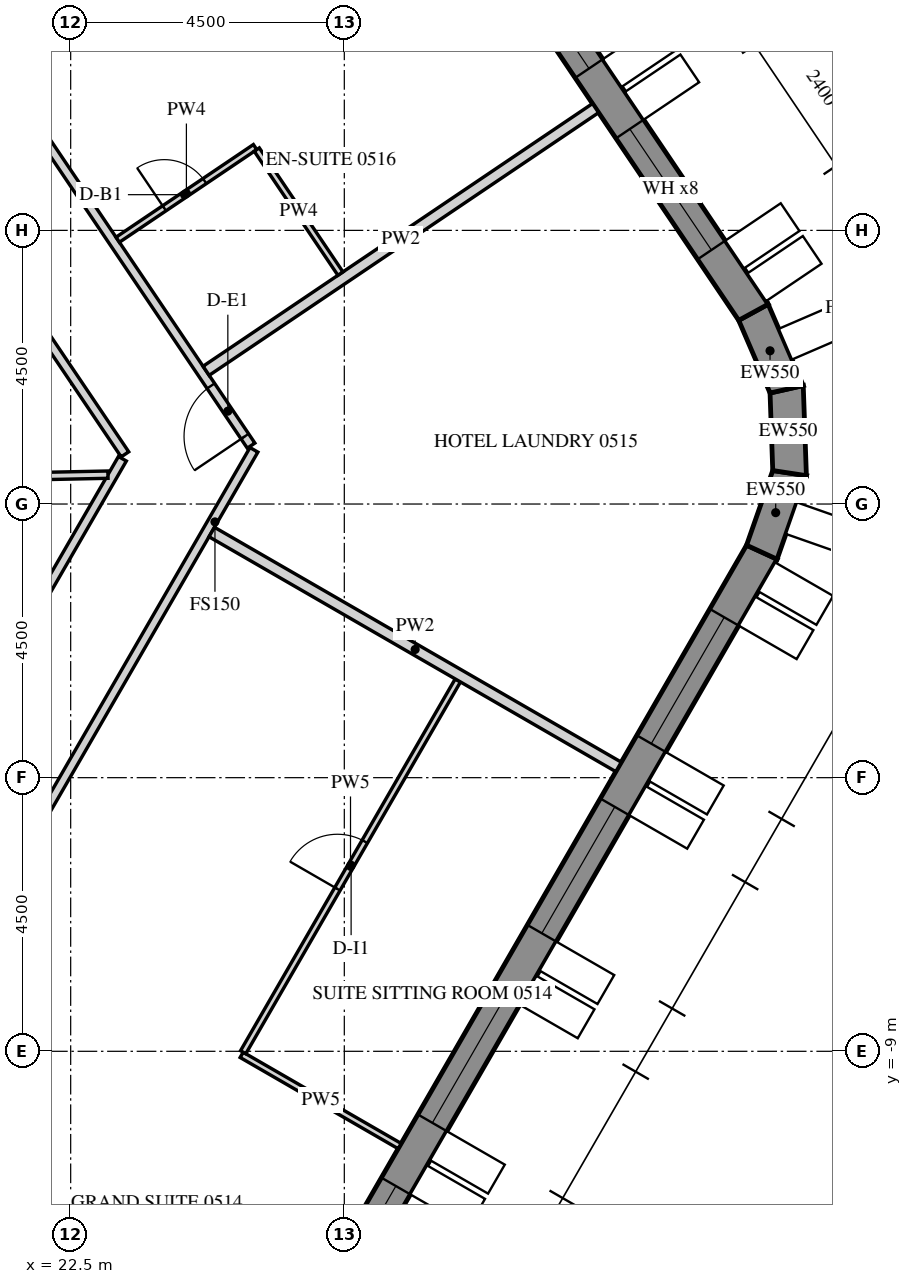
"""IFC4 building model, lengths in metres.
Left out: names, types, materials, properties, quantities, classifications, styles, units other than length and angle.
Written with IfcOpenShell. Run it as: python <this file> out.ifc"""

import sys

from ifc_helpers import new_model, si_unit, direction, frame, frame_2d, origin, place, context, subcontext, project, spatial, polyline, rectangle, outline, extrude, element, fill, save


model = new_model("IFC4")
c1 = context("Model", 3, precision=1e-05, world=origin(), true_north=direction((0.0, 1.0)))
c2 = subcontext(c1, "Body", "Model", "MODEL_VIEW")
j1 = project(units=[si_unit("LENGTHUNIT", "METRE"), si_unit("PLANEANGLEUNIT", "RADIAN")], contexts=[c1])
p1 = place(None, origin())
s1 = spatial("IfcSite", under=j1, at=p1, CompositionType="ELEMENT")
p2 = place(p1, origin())
s2 = spatial("IfcBuilding", under=s1, at=p2, CompositionType="ELEMENT")
p3 = place(p2, frame((0.0, 0.0, 80.4)))
s3 = spatial("IfcBuildingStorey", under=s2, at=p3, CompositionType="ELEMENT", Elevation=80.4)
p4 = place(p3, frame((18.83, -26.835, -0.15), z_axis=(0.0, 0.0, 1.0), x_axis=(0.500003800416, 0.866023209602, 0.0)))
e1 = element("IfcWall", 1, at=p4, inside=s3, PredefinedType="SOLIDWALL", context=c2, shape_type="SweptSolid", body=[
    extrude(outline(polyline([(-0.022, -0.275), (30.097, -0.275), (30.045, 0.275), (0.022, 0.275), (-0.022, -0.275)])), origin(), (0.0, 0.0, 1.0), 3.9),
])
p5 = place(p4, frame((1.236, 0.0, 1.05)))
e2 = element("IfcOpeningElement", 2, at=p5, cuts=e1, PredefinedType="OPENING", context=c2, shape_type="SweptSolid", body=[
    extrude(rectangle(XDim=2.4, YDim=2.4, at=frame_2d((1.2, 1.2))), frame((0.0, 0.285, 0.0), z_axis=(0.0, -1.0, 0.0), x_axis=(1.0, 0.0, 0.0)), (0.0, 0.0, 1.0), 0.57),
])
p6 = place(p4, frame((4.835, 0.0, 1.05)))
e3 = element("IfcOpeningElement", 3, at=p6, cuts=e1, PredefinedType="OPENING", context=c2, shape_type="SweptSolid", body=[
    extrude(rectangle(XDim=2.4, YDim=2.4, at=frame_2d((1.2, 1.2))), frame((0.0, 0.285, 0.0), z_axis=(0.0, -1.0, 0.0), x_axis=(1.0, 0.0, 0.0)), (0.0, 0.0, 1.0), 0.57),
])
p7 = place(p4, frame((8.436, 0.0, 1.05)))
e4 = element("IfcOpeningElement", 4, at=p7, cuts=e1, PredefinedType="OPENING", context=c2, shape_type="SweptSolid", body=[
    extrude(rectangle(XDim=2.4, YDim=2.4, at=frame_2d((1.2, 1.2))), frame((0.0, 0.285, 0.0), z_axis=(0.0, -1.0, 0.0), x_axis=(1.0, 0.0, 0.0)), (0.0, 0.0, 1.0), 0.57),
])
p8 = place(p4, frame((12.035, 0.0, 1.05)))
e5 = element("IfcOpeningElement", 5, at=p8, cuts=e1, PredefinedType="OPENING", context=c2, shape_type="SweptSolid", body=[
    extrude(rectangle(XDim=2.4, YDim=2.4, at=frame_2d((1.2, 1.2))), frame((0.0, 0.285, 0.0), z_axis=(0.0, -1.0, 0.0), x_axis=(1.0, 0.0, 0.0)), (0.0, 0.0, 1.0), 0.57),
])
p9 = place(p4, frame((15.635, 0.0, 1.05)))
e6 = element("IfcOpeningElement", 6, at=p9, cuts=e1, PredefinedType="OPENING", context=c2, shape_type="SweptSolid", body=[
    extrude(rectangle(XDim=2.4, YDim=2.4, at=frame_2d((1.2, 1.2))), frame((0.0, 0.285, 0.0), z_axis=(0.0, -1.0, 0.0), x_axis=(1.0, 0.0, 0.0)), (0.0, 0.0, 1.0), 0.57),
])
p10 = place(p4, frame((19.236, 0.0, 1.05)))
e7 = element("IfcOpeningElement", 7, at=p10, cuts=e1, PredefinedType="OPENING", context=c2, shape_type="SweptSolid", body=[
    extrude(rectangle(XDim=2.4, YDim=2.4, at=frame_2d((1.2, 1.2))), frame((0.0, 0.285, 0.0), z_axis=(0.0, -1.0, 0.0), x_axis=(1.0, 0.0, 0.0)), (0.0, 0.0, 1.0), 0.57),
])
p11 = place(p4, frame((22.835, 0.0, 1.05)))
e8 = element("IfcOpeningElement", 8, at=p11, cuts=e1, PredefinedType="OPENING", context=c2, shape_type="SweptSolid", body=[
    extrude(rectangle(XDim=2.4, YDim=2.4, at=frame_2d((1.2, 1.2))), frame((0.0, 0.285, 0.0), z_axis=(0.0, -1.0, 0.0), x_axis=(1.0, 0.0, 0.0)), (0.0, 0.0, 1.0), 0.57),
])
p12 = place(p4, frame((26.436, 0.0, 1.05)))
e9 = element("IfcOpeningElement", 9, at=p12, cuts=e1, PredefinedType="OPENING", context=c2, shape_type="SweptSolid", body=[
    extrude(rectangle(XDim=2.4, YDim=2.4, at=frame_2d((1.2, 1.2))), frame((0.0, 0.285, 0.0), z_axis=(0.0, -1.0, 0.0), x_axis=(1.0, 0.0, 0.0)), (0.0, 0.0, 1.0), 0.57),
])
p13 = place(p3, frame((33.866, -0.792, -0.15), z_axis=(0.0, 0.0, 1.0), x_axis=(0.33111537203, 0.943590276765, 0.0)))
e10 = element("IfcWall", 10, at=p13, inside=s3, PredefinedType="SOLIDWALL", context=c2, shape_type="SweptSolid", body=[
    extrude(outline(polyline([(-0.026, -0.275), (1.431, -0.275), (1.327, 0.275), (0.026, 0.275), (-0.026, -0.275)])), origin(), (0.0, 0.0, 1.0), 3.9),
])
p14 = place(p3, frame((34.323, 0.509, -0.15), z_axis=(0.0, 0.0, 1.0), x_axis=(-0.034876908462, 0.999391615562, 0.0)))
e11 = element("IfcWall", 11, at=p14, inside=s3, PredefinedType="SOLIDWALL", context=c2, shape_type="SweptSolid", body=[
    extrude(outline(polyline([(-0.052, -0.275), (1.431, -0.275), (1.327, 0.275), (0.052, 0.275), (-0.052, -0.275)])), origin(), (0.0, 0.0, 1.0), 3.9),
])
p15 = place(p3, frame((34.274, 1.887, -0.15), z_axis=(0.0, 0.0, 1.0), x_axis=(-0.396161342798, 0.918180913803, 0.0)))
e12 = element("IfcWall", 12, at=p15, inside=s3, PredefinedType="SOLIDWALL", context=c2, shape_type="SweptSolid", body=[
    extrude(outline(polyline([(-0.052, -0.275), (1.405, -0.275), (1.354, 0.275), (0.052, 0.275), (-0.052, -0.275)])), origin(), (0.0, 0.0, 1.0), 3.9),
])
p16 = place(p3, frame((33.728, 3.153, -0.15), z_axis=(0.0, 0.0, 1.0), x_axis=(-0.559192411416, 0.82903790445, 0.0)))
e13 = element("IfcWall", 13, at=p16, inside=s3, PredefinedType="SOLIDWALL", context=c2, shape_type="SweptSolid", body=[
    extrude(outline(polyline([(-0.026, -0.275), (30.093, -0.275), (30.048, 0.275), (0.026, 0.275), (-0.026, -0.275)])), origin(), (0.0, 0.0, 1.0), 3.9),
])
p17 = place(p16, frame((1.236, 0.0, 1.05)))
e14 = element("IfcOpeningElement", 14, at=p17, cuts=e13, PredefinedType="OPENING", context=c2, shape_type="SweptSolid", body=[
    extrude(rectangle(XDim=2.4, YDim=2.4, at=frame_2d((1.2, 1.2))), frame((0.0, 0.285, 0.0), z_axis=(0.0, -1.0, 0.0), x_axis=(1.0, 0.0, 0.0)), (0.0, 0.0, 1.0), 0.57),
])
p18 = place(p16, frame((4.835, 0.0, 1.05)))
e15 = element("IfcOpeningElement", 15, at=p18, cuts=e13, PredefinedType="OPENING", context=c2, shape_type="SweptSolid", body=[
    extrude(rectangle(XDim=2.4, YDim=2.4, at=frame_2d((1.2, 1.2))), frame((0.0, 0.285, 0.0), z_axis=(0.0, -1.0, 0.0), x_axis=(1.0, 0.0, 0.0)), (0.0, 0.0, 1.0), 0.57),
])
p19 = place(p16, frame((8.436, 0.0, 1.05)))
e16 = element("IfcOpeningElement", 16, at=p19, cuts=e13, PredefinedType="OPENING", context=c2, shape_type="SweptSolid", body=[
    extrude(rectangle(XDim=2.4, YDim=2.4, at=frame_2d((1.2, 1.2))), frame((0.0, 0.285, 0.0), z_axis=(0.0, -1.0, 0.0), x_axis=(1.0, 0.0, 0.0)), (0.0, 0.0, 1.0), 0.57),
])
p20 = place(p16, frame((12.035, 0.0, 1.05)))
e17 = element("IfcOpeningElement", 17, at=p20, cuts=e13, PredefinedType="OPENING", context=c2, shape_type="SweptSolid", body=[
    extrude(rectangle(XDim=2.4, YDim=2.4, at=frame_2d((1.2, 1.2))), frame((0.0, 0.285, 0.0), z_axis=(0.0, -1.0, 0.0), x_axis=(1.0, 0.0, 0.0)), (0.0, 0.0, 1.0), 0.57),
])
p21 = place(p16, frame((15.635, 0.0, 1.05)))
e18 = element("IfcOpeningElement", 18, at=p21, cuts=e13, PredefinedType="OPENING", context=c2, shape_type="SweptSolid", body=[
    extrude(rectangle(XDim=2.4, YDim=2.4, at=frame_2d((1.2, 1.2))), frame((0.0, 0.285, 0.0), z_axis=(0.0, -1.0, 0.0), x_axis=(1.0, 0.0, 0.0)), (0.0, 0.0, 1.0), 0.57),
])
p22 = place(p16, frame((19.236, 0.0, 1.05)))
e19 = element("IfcOpeningElement", 19, at=p22, cuts=e13, PredefinedType="OPENING", context=c2, shape_type="SweptSolid", body=[
    extrude(rectangle(XDim=2.4, YDim=2.4, at=frame_2d((1.2, 1.2))), frame((0.0, 0.285, 0.0), z_axis=(0.0, -1.0, 0.0), x_axis=(1.0, 0.0, 0.0)), (0.0, 0.0, 1.0), 0.57),
])
p23 = place(p16, frame((22.835, 0.0, 1.05)))
e20 = element("IfcOpeningElement", 20, at=p23, cuts=e13, PredefinedType="OPENING", context=c2, shape_type="SweptSolid", body=[
    extrude(rectangle(XDim=2.4, YDim=2.4, at=frame_2d((1.2, 1.2))), frame((0.0, 0.285, 0.0), z_axis=(0.0, -1.0, 0.0), x_axis=(1.0, 0.0, 0.0)), (0.0, 0.0, 1.0), 0.57),
])
p24 = place(p16, frame((26.436, 0.0, 1.05)))
e21 = element("IfcOpeningElement", 21, at=p24, cuts=e13, PredefinedType="OPENING", context=c2, shape_type="SweptSolid", body=[
    extrude(rectangle(XDim=2.4, YDim=2.4, at=frame_2d((1.2, 1.2))), frame((0.0, 0.285, 0.0), z_axis=(0.0, -1.0, 0.0), x_axis=(1.0, 0.0, 0.0)), (0.0, 0.0, 1.0), 0.57),
])
p25 = place(p3, frame((13.755, -19.475, 0.0), z_axis=(0.0, 0.0, 1.0), x_axis=(0.50000013933, 0.866025323342, 0.0)))
e22 = element("IfcWall", 22, at=p25, inside=s3, PredefinedType="PARTITIONING", context=c2, shape_type="SweptSolid", body=[
    extrude(rectangle(XDim=23.517, YDim=0.15, at=frame_2d((11.758, 0.0))), origin(), (0.0, 0.0, 1.0), 2.988),
])
p26 = place(p25, frame((2.056, 0.0, 0.0)))
e23 = element("IfcOpeningElement", 23, at=p26, cuts=e22, PredefinedType="OPENING", context=c2, shape_type="SweptSolid", body=[
    extrude(rectangle(XDim=1.0, YDim=2.1, at=frame_2d((0.5, 1.05))), frame((0.0, 0.085, 0.0), z_axis=(0.0, -1.0, 0.0), x_axis=(1.0, 0.0, 0.0)), (0.0, 0.0, 1.0), 0.17),
])
p27 = place(p25, frame((15.499, 0.0, 0.0)))
e24 = element("IfcOpeningElement", 24, at=p27, cuts=e22, PredefinedType="OPENING", context=c2, shape_type="SweptSolid", body=[
    extrude(rectangle(XDim=1.0, YDim=2.1, at=frame_2d((0.5, 1.05))), frame((0.0, 0.085, 0.0), z_axis=(0.0, -1.0, 0.0), x_axis=(1.0, 0.0, 0.0)), (0.0, 0.0, 1.0), 0.17),
])
p28 = place(p3, frame((25.467, 0.96, 0.0), z_axis=(0.0, 0.0, 1.0), x_axis=(-0.559192112521, 0.829038106057, 0.0)))
e25 = element("IfcWall", 25, at=p28, inside=s3, PredefinedType="PARTITIONING", context=c2, shape_type="SweptSolid", body=[
    extrude(rectangle(XDim=21.584, YDim=0.15, at=frame_2d((10.792, 0.0))), origin(), (0.0, 0.0, 1.0), 2.988),
])
p29 = place(p28, frame((0.184, 0.0, 0.0)))
e26 = element("IfcOpeningElement", 26, at=p29, cuts=e25, PredefinedType="OPENING", context=c2, shape_type="SweptSolid", body=[
    extrude(rectangle(XDim=1.0, YDim=2.1, at=frame_2d((0.5, 1.05))), frame((0.0, 0.085, 0.0), z_axis=(0.0, -1.0, 0.0), x_axis=(1.0, 0.0, 0.0)), (0.0, 0.0, 1.0), 0.17),
])
p30 = place(p28, frame((9.434, 0.0, 0.0)))
e27 = element("IfcOpeningElement", 27, at=p30, cuts=e25, PredefinedType="OPENING", context=c2, shape_type="SweptSolid", body=[
    extrude(rectangle(XDim=1.0, YDim=2.1, at=frame_2d((0.5, 1.05))), frame((0.0, 0.085, 0.0), z_axis=(0.0, -1.0, 0.0), x_axis=(1.0, 0.0, 0.0)), (0.0, 0.0, 1.0), 0.17),
])
p31 = place(p28, frame((16.951, 0.0, 0.0)))
e28 = element("IfcOpeningElement", 28, at=p31, cuts=e25, PredefinedType="OPENING", context=c2, shape_type="SweptSolid", body=[
    extrude(rectangle(XDim=1.0, YDim=2.1, at=frame_2d((0.5, 1.05))), frame((0.0, 0.085, 0.0), z_axis=(0.0, -1.0, 0.0), x_axis=(1.0, 0.0, 0.0)), (0.0, 0.0, 1.0), 0.17),
])
p32 = place(p3, frame((23.351, 0.745, 0.0), z_axis=(0.0, 0.0, 1.0), x_axis=(-0.49999316964, -0.866029347258, 0.0)))
e29 = element("IfcWall", 29, at=p32, inside=s3, PredefinedType="PARTITIONING", context=c2, shape_type="SweptSolid", body=[
    extrude(rectangle(XDim=11.241, YDim=0.15, at=frame_2d((5.621, 0.0))), origin(), (0.0, 0.0, 1.0), 2.988),
])
p33 = place(p32, frame((5.171, 0.0, 0.0)))
e30 = element("IfcOpeningElement", 30, at=p33, cuts=e29, PredefinedType="OPENING", context=c2, shape_type="SweptSolid", body=[
    extrude(rectangle(XDim=0.9, YDim=2.1, at=frame_2d((0.45, 1.05))), frame((0.0, 0.085, 0.0), z_axis=(0.0, -1.0, 0.0), x_axis=(1.0, 0.0, 0.0)), (0.0, 0.0, 1.0), 0.17),
])
p34 = place(p3, frame((17.879, 8.99, 0.0), z_axis=(0.0, 0.0, 1.0), x_axis=(0.559189565351, -0.829039824136, 0.0)))
e31 = element("IfcWall", 31, at=p34, inside=s3, PredefinedType="PARTITIONING", context=c2, shape_type="SweptSolid", body=[
    extrude(rectangle(XDim=9.859, YDim=0.15, at=frame_2d((4.929, 0.0))), origin(), (0.0, 0.0, 1.0), 2.988),
])
p35 = place(p34, frame((4.479, 0.0, 0.0)))
e32 = element("IfcOpeningElement", 32, at=p35, cuts=e31, PredefinedType="OPENING", context=c2, shape_type="SweptSolid", body=[
    extrude(rectangle(XDim=0.9, YDim=2.1, at=frame_2d((0.45, 1.05))), frame((0.0, 0.085, 0.0), z_axis=(0.0, -1.0, 0.0), x_axis=(1.0, 0.0, 0.0)), (0.0, 0.0, 1.0), 0.17),
])
p36 = place(p3, frame((27.91, -10.559, 0.0), z_axis=(0.0, 0.0, 1.0), x_axis=(-0.866010750942, 0.50002537861, 0.0)))
e33 = element("IfcWall", 33, at=p36, inside=s3, PredefinedType="PARTITIONING", context=c2, shape_type="SweptSolid", body=[
    extrude(rectangle(XDim=3.0, YDim=0.1, at=frame_2d((1.5, 0.0))), origin(), (0.0, 0.0, 1.0), 2.988),
])
p37 = place(p3, frame((25.337, -9.015, 0.0), z_axis=(0.0, 0.0, 1.0), x_axis=(0.500010820671, 0.866019156377, 0.0)))
e34 = element("IfcWall", 34, at=p37, inside=s3, PredefinedType="PARTITIONING", context=c2, shape_type="SweptSolid", body=[
    extrude(rectangle(XDim=7.06, YDim=0.1, at=frame_2d((3.53, 0.0))), origin(), (0.0, 0.0, 1.0), 2.988),
])
p38 = place(p37, frame((3.1, 0.0, 0.0)))
e35 = element("IfcOpeningElement", 35, at=p38, cuts=e34, PredefinedType="OPENING", context=c2, shape_type="SweptSolid", body=[
    extrude(rectangle(XDim=0.9, YDim=2.1, at=frame_2d((0.45, 1.05))), frame((0.0, 0.06, 0.0), z_axis=(0.0, -1.0, 0.0), x_axis=(1.0, 0.0, 0.0)), (0.0, 0.0, 1.0), 0.12),
])
p39 = place(p3, frame((31.51, -4.323, 0.0), z_axis=(0.0, 0.0, 1.0), x_axis=(-0.866027174938, 0.499996932259, 0.0)))
e36 = element("IfcWall", 36, at=p39, inside=s3, PredefinedType="PARTITIONING", context=c2, shape_type="SweptSolid", body=[
    extrude(rectangle(XDim=7.725, YDim=0.18, at=frame_2d((3.863, 0.0))), origin(), (0.0, 0.0, 1.0), 2.988),
])
p40 = place(p3, frame((31.132, 6.51, 0.0), z_axis=(0.0, 0.0, 1.0), x_axis=(-0.829047937134, -0.559177537043, 0.0)))
e37 = element("IfcWall", 37, at=p40, inside=s3, PredefinedType="PARTITIONING", context=c2, shape_type="SweptSolid", body=[
    extrude(rectangle(XDim=7.725, YDim=0.18, at=frame_2d((3.862, 0.0))), origin(), (0.0, 0.0, 1.0), 2.988),
])
p41 = place(p3, frame((23.273, 4.346, 0.0), z_axis=(0.0, 0.0, 1.0), x_axis=(0.829005477618, 0.559240483226, 0.0)))
e38 = element("IfcWall", 38, at=p41, inside=s3, PredefinedType="PARTITIONING", context=c2, shape_type="SweptSolid", body=[
    extrude(rectangle(XDim=2.725, YDim=0.1, at=frame_2d((1.363, 0.0))), origin(), (0.0, 0.0, 1.0), 2.988),
])
p42 = place(p41, frame((0.925, 0.0, 0.0)))
e39 = element("IfcOpeningElement", 39, at=p42, cuts=e38, PredefinedType="OPENING", context=c2, shape_type="SweptSolid", body=[
    extrude(rectangle(XDim=0.8, YDim=2.1, at=frame_2d((0.4, 1.05))), frame((0.0, 0.06, 0.0), z_axis=(0.0, -1.0, 0.0), x_axis=(1.0, 0.0, 0.0)), (0.0, 0.0, 1.0), 0.12),
])
p43 = place(p3, frame((25.561, 5.829, 0.0), z_axis=(0.0, 0.0, 1.0), x_axis=(0.559249542518, -0.82899936622, 0.0)))
e40 = element("IfcWall", 40, at=p43, inside=s3, PredefinedType="PARTITIONING", context=c2, shape_type="SweptSolid", body=[
    extrude(rectangle(XDim=2.46, YDim=0.1, at=frame_2d((1.23, 0.0))), origin(), (0.0, 0.0, 1.0), 2.988),
])
p44 = place(p3, frame((23.113, 0.483, 0.0), z_axis=(0.0, 0.0, 1.0), x_axis=(-0.999781109464, -0.020922073482, 0.0)))
e41 = element("IfcWall", 41, at=p44, inside=s3, PredefinedType="PARTITIONING", context=c2, shape_type="SweptSolid", body=[
    extrude(rectangle(XDim=7.141, YDim=0.12, at=frame_2d((3.571, 0.0))), origin(), (0.0, 0.0, 1.0), 2.988),
])
p45 = place(p9, frame((0.0, 0.205, 0.0)))
e42 = element("IfcWindow", 42, at=p45, inside=s3, PartitioningType="DOUBLE_PANEL_VERTICAL", PredefinedType="WINDOW", context=c2, shape_type="SweptSolid", body=[
    extrude(rectangle(XDim=2.4, YDim=2.4, at=frame_2d((1.2, 1.2))), frame((0.0, 0.03, 0.0), z_axis=(0.0, -1.0, 0.0), x_axis=(1.0, 0.0, 0.0)), (0.0, 0.0, 1.0), 0.06),
])
fill(e6, e42)
p46 = place(p10, frame((0.0, 0.205, 0.0)))
e43 = element("IfcWindow", 43, at=p46, inside=s3, PartitioningType="DOUBLE_PANEL_VERTICAL", PredefinedType="WINDOW", context=c2, shape_type="SweptSolid", body=[
    extrude(rectangle(XDim=2.4, YDim=2.4, at=frame_2d((1.2, 1.2))), frame((0.0, 0.03, 0.0), z_axis=(0.0, -1.0, 0.0), x_axis=(1.0, 0.0, 0.0)), (0.0, 0.0, 1.0), 0.06),
])
fill(e7, e43)
p47 = place(p11, frame((0.0, 0.205, 0.0)))
e44 = element("IfcWindow", 44, at=p47, inside=s3, PartitioningType="DOUBLE_PANEL_VERTICAL", PredefinedType="WINDOW", context=c2, shape_type="SweptSolid", body=[
    extrude(rectangle(XDim=2.4, YDim=2.4, at=frame_2d((1.2, 1.2))), frame((0.0, 0.03, 0.0), z_axis=(0.0, -1.0, 0.0), x_axis=(1.0, 0.0, 0.0)), (0.0, 0.0, 1.0), 0.06),
])
fill(e8, e44)
p48 = place(p12, frame((0.0, 0.205, 0.0)))
e45 = element("IfcWindow", 45, at=p48, inside=s3, PartitioningType="DOUBLE_PANEL_VERTICAL", PredefinedType="WINDOW", context=c2, shape_type="SweptSolid", body=[
    extrude(rectangle(XDim=2.4, YDim=2.4, at=frame_2d((1.2, 1.2))), frame((0.0, 0.03, 0.0), z_axis=(0.0, -1.0, 0.0), x_axis=(1.0, 0.0, 0.0)), (0.0, 0.0, 1.0), 0.06),
])
fill(e9, e45)
p49 = place(p17, frame((0.0, 0.205, 0.0)))
e46 = element("IfcWindow", 46, at=p49, inside=s3, PartitioningType="DOUBLE_PANEL_VERTICAL", PredefinedType="WINDOW", context=c2, shape_type="SweptSolid", body=[
    extrude(rectangle(XDim=2.4, YDim=2.4, at=frame_2d((1.2, 1.2))), frame((0.0, 0.03, 0.0), z_axis=(0.0, -1.0, 0.0), x_axis=(1.0, 0.0, 0.0)), (0.0, 0.0, 1.0), 0.06),
])
fill(e14, e46)
p50 = place(p18, frame((0.0, 0.205, 0.0)))
e47 = element("IfcWindow", 47, at=p50, inside=s3, PartitioningType="DOUBLE_PANEL_VERTICAL", PredefinedType="WINDOW", context=c2, shape_type="SweptSolid", body=[
    extrude(rectangle(XDim=2.4, YDim=2.4, at=frame_2d((1.2, 1.2))), frame((0.0, 0.03, 0.0), z_axis=(0.0, -1.0, 0.0), x_axis=(1.0, 0.0, 0.0)), (0.0, 0.0, 1.0), 0.06),
])
fill(e15, e47)
p51 = place(p38, origin())
e48 = element("IfcDoor", 48, at=p51, inside=s3, OperationType="SINGLE_SWING_RIGHT", PredefinedType="DOOR", context=c2, shape_type="SweptSolid", body=[
    extrude(rectangle(XDim=0.9, YDim=2.1, at=frame_2d((0.45, 1.05))), frame((0.0, 0.025, 0.0), z_axis=(0.0, -1.0, 0.0), x_axis=(1.0, 0.0, 0.0)), (0.0, 0.0, 1.0), 0.05),
])
fill(e35, e48)
p52 = place(p29, origin())
e49 = element("IfcDoor", 49, at=p52, inside=s3, OperationType="SINGLE_SWING_RIGHT", PredefinedType="DOOR", context=c2, shape_type="SweptSolid", body=[
    extrude(rectangle(XDim=1.0, YDim=2.1, at=frame_2d((0.5, 1.05))), frame((0.0, 0.025, 0.0), z_axis=(0.0, -1.0, 0.0), x_axis=(1.0, 0.0, 0.0)), (0.0, 0.0, 1.0), 0.05),
])
fill(e26, e49)
p53 = place(p42, origin())
e50 = element("IfcDoor", 50, at=p53, inside=s3, OperationType="SINGLE_SWING_RIGHT", PredefinedType="DOOR", context=c2, shape_type="SweptSolid", body=[
    extrude(rectangle(XDim=0.8, YDim=2.1, at=frame_2d((0.4, 1.05))), frame((0.0, 0.025, 0.0), z_axis=(0.0, -1.0, 0.0), x_axis=(1.0, 0.0, 0.0)), (0.0, 0.0, 1.0), 0.05),
])
fill(e39, e50)
save(model, sys.argv[1])
